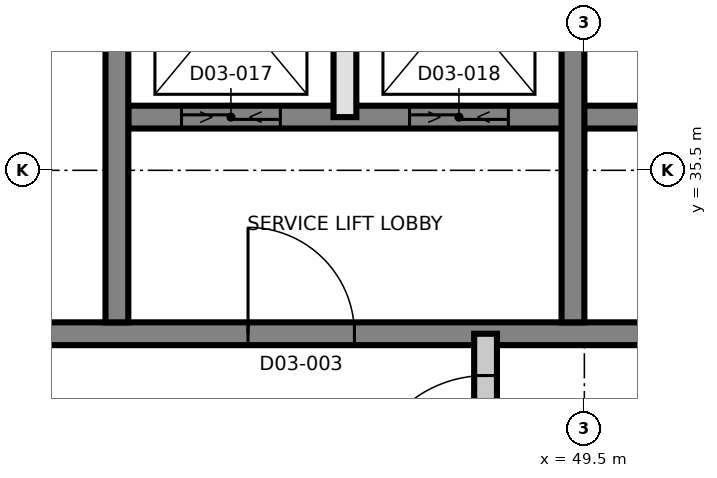
"""IFC4 building model, lengths in metres.
Left out: names, types, materials, properties, quantities, classifications, styles, units other than length and angle.
Written with IfcOpenShell. Run it as: python <this file> out.ifc"""

import sys

from ifc_helpers import new_model, si_unit, direction, frame, frame_2d, origin, place, context, subcontext, project, spatial, rectangle, extrude, element, fill, save


model = new_model("IFC4")
c1 = context("Model", 3, precision=1e-05, world=origin(), true_north=direction((0.0, 1.0)))
c2 = subcontext(c1, "Body", "Model", "MODEL_VIEW")
j1 = project(units=[si_unit("LENGTHUNIT", "METRE"), si_unit("PLANEANGLEUNIT", "RADIAN")], contexts=[c1])
p1 = place(None, origin())
s1 = spatial("IfcSite", under=j1, at=p1, CompositionType="ELEMENT")
p2 = place(p1, origin())
s2 = spatial("IfcBuilding", under=s1, at=p2, CompositionType="ELEMENT")
p3 = place(p2, frame((0.0, 0.0, 55.7)))
s3 = spatial("IfcBuildingStorey", under=s2, at=p3, CompositionType="ELEMENT", Elevation=55.7)
p4 = place(p3, frame((31.95, 33.35, 0.0), z_axis=(0.0, 0.0, 1.0), x_axis=(1.0, 0.0, 0.0)))
e1 = element("IfcWall", 1, at=p4, inside=s3, PredefinedType="SHEAR", context=c2, shape_type="SweptSolid", body=[
    extrude(rectangle(XDim=26.1, YDim=0.3, at=frame_2d((13.05, 0.0))), origin(), (0.0, 0.0, 1.0), 3.7),
])
p5 = place(p4, frame((13.125, 0.0, 0.0)))
e2 = element("IfcOpeningElement", 2, at=p5, cuts=e1, PredefinedType="OPENING", context=c2, shape_type="SweptSolid", body=[
    extrude(rectangle(XDim=1.4, YDim=2.1, at=frame_2d((0.7, 1.05))), frame((0.0, 0.16, 0.0), z_axis=(0.0, -1.0, 0.0), x_axis=(1.0, 0.0, 0.0)), (0.0, 0.0, 1.0), 0.32),
])
p6 = place(p4, frame((5.175, 0.0, 0.0)))
e3 = element("IfcOpeningElement", 3, at=p6, cuts=e1, PredefinedType="OPENING", context=c2, shape_type="SweptSolid", body=[
    extrude(rectangle(XDim=1.2, YDim=2.1, at=frame_2d((0.6, 1.05))), frame((0.0, 0.16, 0.0), z_axis=(0.0, -1.0, 0.0), x_axis=(1.0, 0.0, 0.0)), (0.0, 0.0, 1.0), 0.32),
])
p7 = place(p4, frame((19.725, 0.0, 0.0)))
e4 = element("IfcOpeningElement", 4, at=p7, cuts=e1, PredefinedType="OPENING", context=c2, shape_type="SweptSolid", body=[
    extrude(rectangle(XDim=1.2, YDim=2.1, at=frame_2d((0.6, 1.05))), frame((0.0, 0.16, 0.0), z_axis=(0.0, -1.0, 0.0), x_axis=(1.0, 0.0, 0.0)), (0.0, 0.0, 1.0), 0.32),
])
p8 = place(p3, frame((43.5, 36.2, 0.0), z_axis=(0.0, 0.0, 1.0), x_axis=(1.0, 0.0, 0.0)))
e5 = element("IfcWall", 5, at=p8, inside=s3, PredefinedType="SHEAR", context=c2, shape_type="SweptSolid", body=[
    extrude(rectangle(XDim=14.55, YDim=0.3, at=frame_2d((7.275, 0.0))), origin(), (0.0, 0.0, 1.0), 3.7),
])
p9 = place(p8, frame((6.9, 0.0, 0.0)))
e6 = element("IfcOpeningElement", 6, at=p9, cuts=e5, PredefinedType="OPENING", context=c2, shape_type="SweptSolid", body=[
    extrude(rectangle(XDim=1.2, YDim=2.1, at=frame_2d((0.6, 1.05))), frame((0.0, 0.16, 0.0), z_axis=(0.0, -1.0, 0.0), x_axis=(1.0, 0.0, 0.0)), (0.0, 0.0, 1.0), 0.32),
])
p10 = place(p8, frame((0.7, 0.0, 0.0)))
e7 = element("IfcOpeningElement", 7, at=p10, cuts=e5, PredefinedType="OPENING", context=c2, shape_type="SweptSolid", body=[
    extrude(rectangle(XDim=1.3, YDim=2.4, at=frame_2d((0.65, 1.2))), frame((0.0, 0.16, 0.0), z_axis=(0.0, -1.0, 0.0), x_axis=(1.0, 0.0, 0.0)), (0.0, 0.0, 1.0), 0.32),
])
p11 = place(p8, frame((3.7, 0.0, 0.0)))
e8 = element("IfcOpeningElement", 8, at=p11, cuts=e5, PredefinedType="OPENING", context=c2, shape_type="SweptSolid", body=[
    extrude(rectangle(XDim=1.3, YDim=2.4, at=frame_2d((0.65, 1.2))), frame((0.0, 0.16, 0.0), z_axis=(0.0, -1.0, 0.0), x_axis=(1.0, 0.0, 0.0)), (0.0, 0.0, 1.0), 0.32),
])
for number, where, z_axis, x_axis in (
    (9, (43.35, 33.5, 0.0), (0.0, 0.0, 1.0), (0.0, 1.0, 0.0)),
    (10, (49.35, 33.5, 0.0), (0.0, 0.0, 1.0), (0.0, 1.0, 0.0)),
):
    element("IfcWall", number, at=place(p3, frame(where, z_axis=z_axis, x_axis=x_axis)), inside=s3, PredefinedType="SHEAR", context=c2, shape_type="SweptSolid", body=[
        extrude(rectangle(XDim=5.55, YDim=0.3, at=frame_2d((2.775, 0.0))), origin(), (0.0, 0.0, 1.0), 3.7),
    ])
p12 = place(p3, frame((46.35, 36.2, 0.0), z_axis=(0.0, 0.0, 1.0), x_axis=(0.0, 1.0, 0.0)))
e11 = element("IfcWall", 11, at=p12, inside=s3, PredefinedType="SOLIDWALL", context=c2, shape_type="SweptSolid", body=[
    extrude(rectangle(XDim=3.0, YDim=0.3, at=frame_2d((1.5, 0.0))), origin(), (0.0, 0.0, 1.0), 3.4),
])
p13 = place(p3, frame((48.2, 24.9, 0.0), z_axis=(0.0, 0.0, 1.0), x_axis=(0.0, 1.0, 0.0)))
e12 = element("IfcWall", 12, at=p13, inside=s3, PredefinedType="PARTITIONING", context=c2, shape_type="SweptSolid", body=[
    extrude(rectangle(XDim=8.45, YDim=0.3, at=frame_2d((4.225, 0.0))), origin(), (0.0, 0.0, 1.0), 3.4),
])
p14 = place(p13, frame((6.3, 0.0, 0.0)))
e13 = element("IfcOpeningElement", 13, at=p14, cuts=e12, PredefinedType="OPENING", context=c2, shape_type="SweptSolid", body=[
    extrude(rectangle(XDim=1.6, YDim=2.1, at=frame_2d((0.8, 1.05))), frame((0.0, 0.16, 0.0), z_axis=(0.0, -1.0, 0.0), x_axis=(1.0, 0.0, 0.0)), (0.0, 0.0, 1.0), 0.32),
])
p15 = place(p14, origin())
e14 = element("IfcDoor", 14, at=p15, inside=s3, OperationType="SINGLE_SWING_LEFT", PredefinedType="DOOR", context=c2, shape_type="SweptSolid", body=[
    extrude(rectangle(XDim=1.6, YDim=2.1, at=frame_2d((0.8, 1.05))), frame((0.0, 0.025, 0.0), z_axis=(0.0, -1.0, 0.0), x_axis=(1.0, 0.0, 0.0)), (0.0, 0.0, 1.0), 0.05),
])
fill(e13, e14)
p16 = place(p5, origin())
e15 = element("IfcDoor", 15, at=p16, inside=s3, OperationType="SINGLE_SWING_RIGHT", PredefinedType="DOOR", context=c2, shape_type="SweptSolid", body=[
    extrude(rectangle(XDim=1.4, YDim=2.1, at=frame_2d((0.7, 1.05))), frame((0.0, 0.025, 0.0), z_axis=(0.0, -1.0, 0.0), x_axis=(1.0, 0.0, 0.0)), (0.0, 0.0, 1.0), 0.05),
])
fill(e2, e15)
p17 = place(p10, origin())
e16 = element("IfcDoor", 16, at=p17, inside=s3, OperationType="SLIDING_TO_LEFT", PredefinedType="DOOR", context=c2, shape_type="SweptSolid", body=[
    extrude(rectangle(XDim=1.3, YDim=2.4, at=frame_2d((0.65, 1.2))), frame((0.0, 0.025, 0.0), z_axis=(0.0, -1.0, 0.0), x_axis=(1.0, 0.0, 0.0)), (0.0, 0.0, 1.0), 0.05),
])
fill(e7, e16)
p18 = place(p11, origin())
e17 = element("IfcDoor", 17, at=p18, inside=s3, OperationType="SLIDING_TO_LEFT", PredefinedType="DOOR", context=c2, shape_type="SweptSolid", body=[
    extrude(rectangle(XDim=1.3, YDim=2.4, at=frame_2d((0.65, 1.2))), frame((0.0, 0.025, 0.0), z_axis=(0.0, -1.0, 0.0), x_axis=(1.0, 0.0, 0.0)), (0.0, 0.0, 1.0), 0.05),
])
fill(e8, e17)
save(model, sys.argv[1])
